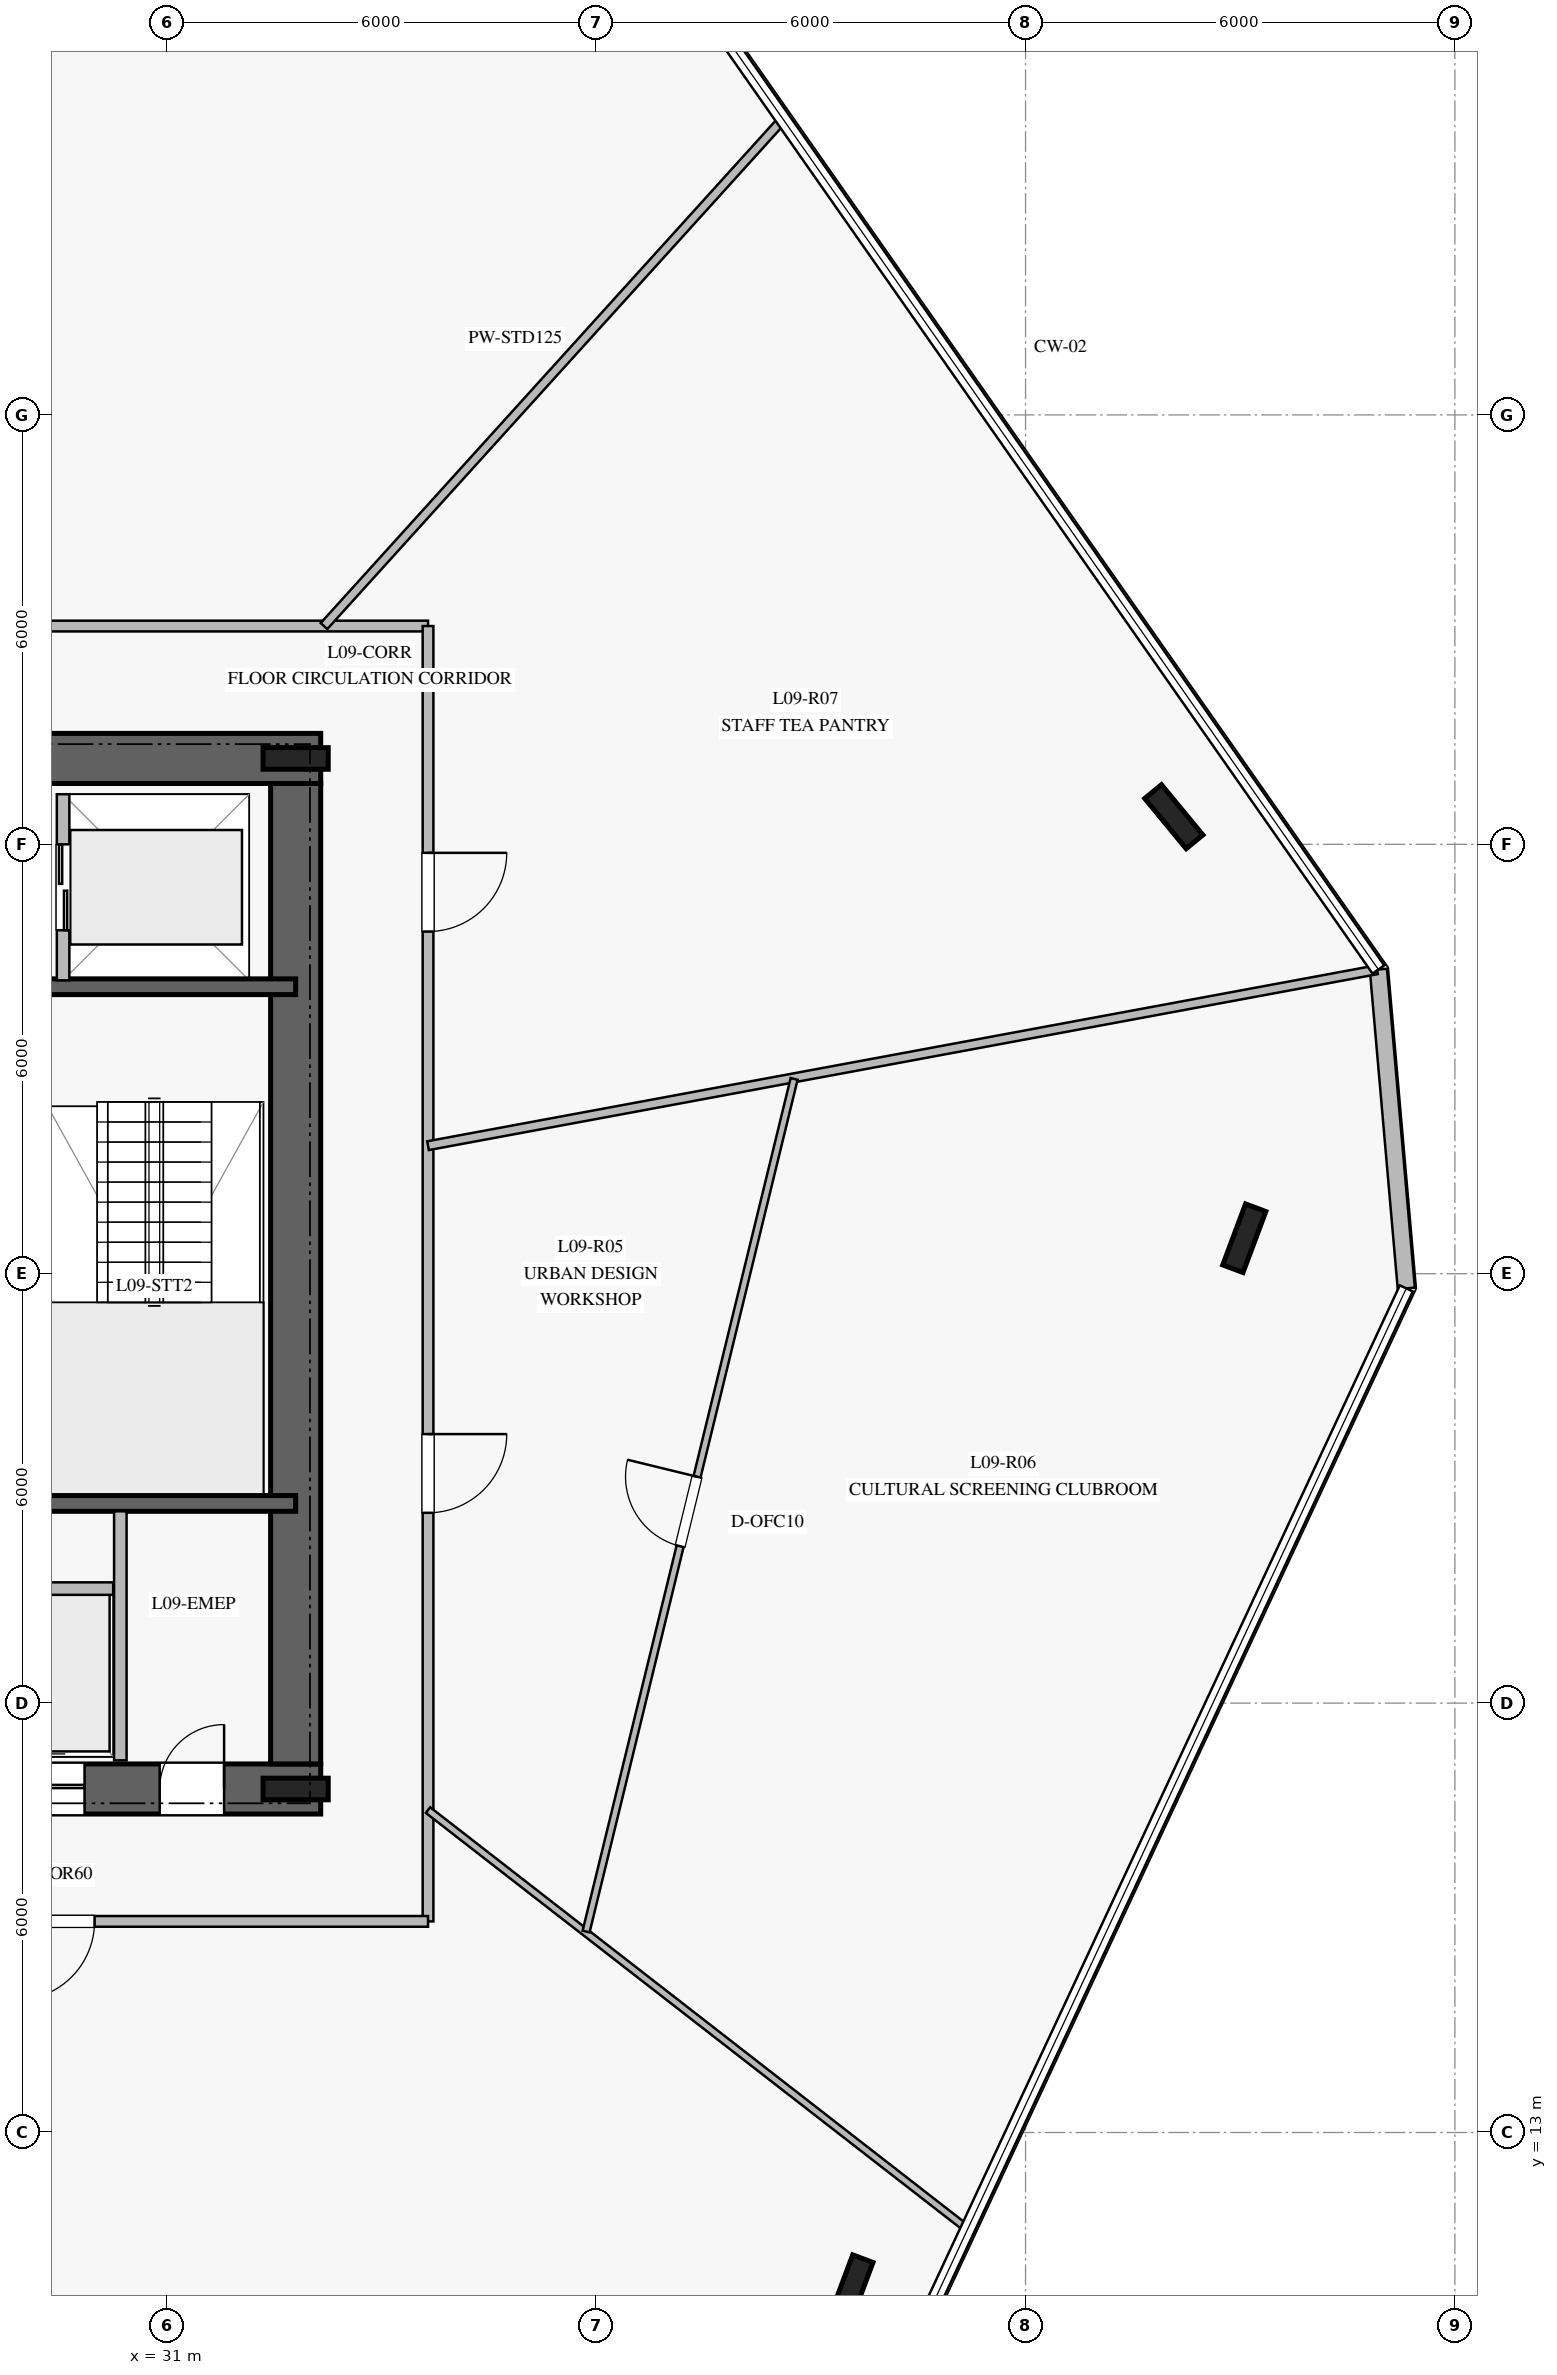
"""IFC4 building model, lengths in metres.
Left out: names, types, materials, properties, quantities, classifications, styles, units other than length and angle.
Written with IfcOpenShell. Run it as: python <this file> out.ifc"""

import sys

from ifc_helpers import new_model, si_unit, direction, frame, frame_2d, origin, origin_2d, place, context, subcontext, project, spatial, rectangle, i_section, extrude, element, fill, save


model = new_model("IFC4")
c1 = context("Model", 3, precision=1e-05, world=origin(), true_north=direction((0.0, 1.0)))
c2 = subcontext(c1, "Body", "Model", "MODEL_VIEW")
j1 = project(units=[si_unit("LENGTHUNIT", "METRE"), si_unit("PLANEANGLEUNIT", "RADIAN")], contexts=[c1])
p1 = place(None, origin())
s1 = spatial("IfcSite", under=j1, at=p1, CompositionType="ELEMENT")
p2 = place(p1, origin())
s2 = spatial("IfcBuilding", under=s1, at=p2, CompositionType="ELEMENT")
p3 = place(p2, frame((0.0, 0.0, 40.0)))
s3 = spatial("IfcBuildingStorey", under=s2, at=p3, CompositionType="ELEMENT", Elevation=40.0)
p4 = place(p3, frame((16.85, 17.8, 0.0), z_axis=(0.0, 0.0, 1.0), x_axis=(1.0, 0.0, 0.0)))
e1 = element("IfcWall", 1, at=p4, inside=s3, PredefinedType="SHEAR", context=c2, shape_type="SweptSolid", body=[
    extrude(rectangle(XDim=16.3, YDim=0.7, at=frame_2d((8.15, 0.0))), origin(), (0.0, 0.0, 1.0), 3.76),
])
p5 = place(p4, frame((5.1, 0.0, 0.0)))
e2 = element("IfcOpeningElement", 2, at=p5, cuts=e1, PredefinedType="OPENING", context=c2, shape_type="SweptSolid", body=[
    extrude(rectangle(XDim=1.2, YDim=2.25, at=frame_2d((0.6, 1.125))), frame((0.0, 0.36, 0.0), z_axis=(0.0, -1.0, 0.0), x_axis=(1.0, 0.0, 0.0)), (0.0, 0.0, 1.0), 0.72),
])
p6 = place(p4, frame((14.05, 0.0, 0.0)))
e3 = element("IfcOpeningElement", 3, at=p6, cuts=e1, PredefinedType="OPENING", context=c2, shape_type="SweptSolid", body=[
    extrude(rectangle(XDim=0.9, YDim=2.1, at=frame_2d((0.45, 1.05))), frame((0.0, 0.36, 0.0), z_axis=(0.0, -1.0, 0.0), x_axis=(1.0, 0.0, 0.0)), (0.0, 0.0, 1.0), 0.72),
])
p7 = place(p4, frame((7.95, 0.0, 0.0)))
e4 = element("IfcOpeningElement", 4, at=p7, cuts=e1, PredefinedType="OPENING", context=c2, shape_type="SweptSolid", body=[
    extrude(rectangle(XDim=1.1, YDim=2.2, at=frame_2d((0.55, 1.1))), frame((0.0, 0.36, 0.0), z_axis=(0.0, -1.0, 0.0), x_axis=(1.0, 0.0, 0.0)), (0.0, 0.0, 1.0), 0.72),
])
p8 = place(p4, frame((9.925, 0.0, 0.0)))
e5 = element("IfcOpeningElement", 5, at=p8, cuts=e1, PredefinedType="OPENING", context=c2, shape_type="SweptSolid", body=[
    extrude(rectangle(XDim=1.1, YDim=2.2, at=frame_2d((0.55, 1.1))), frame((0.0, 0.36, 0.0), z_axis=(0.0, -1.0, 0.0), x_axis=(1.0, 0.0, 0.0)), (0.0, 0.0, 1.0), 0.72),
])
p9 = place(p4, frame((11.9, 0.0, 0.0)))
e6 = element("IfcOpeningElement", 6, at=p9, cuts=e1, PredefinedType="OPENING", context=c2, shape_type="SweptSolid", body=[
    extrude(rectangle(XDim=1.1, YDim=2.2, at=frame_2d((0.55, 1.1))), frame((0.0, 0.36, 0.0), z_axis=(0.0, -1.0, 0.0), x_axis=(1.0, 0.0, 0.0)), (0.0, 0.0, 1.0), 0.72),
])
p10 = place(p3, frame((33.15, 32.2, 0.0), z_axis=(0.0, 0.0, 1.0), x_axis=(-1.0, 0.0, 0.0)))
e7 = element("IfcWall", 7, at=p10, inside=s3, PredefinedType="SHEAR", context=c2, shape_type="SweptSolid", body=[
    extrude(rectangle(XDim=16.3, YDim=0.7, at=frame_2d((8.15, 0.0))), origin(), (0.0, 0.0, 1.0), 3.76),
])
p11 = place(p10, frame((5.1, 0.0, 0.0)))
e8 = element("IfcOpeningElement", 8, at=p11, cuts=e7, PredefinedType="OPENING", context=c2, shape_type="SweptSolid", body=[
    extrude(rectangle(XDim=1.2, YDim=2.25, at=frame_2d((0.6, 1.125))), frame((0.0, 0.36, 0.0), z_axis=(0.0, -1.0, 0.0), x_axis=(1.0, 0.0, 0.0)), (0.0, 0.0, 1.0), 0.72),
])
p12 = place(p3, frame((32.8, 18.15, 0.0), z_axis=(0.0, 0.0, 1.0), x_axis=(0.0, 1.0, 0.0)))
e9 = element("IfcWall", 9, at=p12, inside=s3, PredefinedType="SHEAR", context=c2, shape_type="SweptSolid", body=[
    extrude(rectangle(XDim=13.7, YDim=0.7, at=frame_2d((6.85, 0.0))), origin(), (0.0, 0.0, 1.0), 3.76),
])
for number, where, z_axis, x_axis in (
    (10, (32.8, 17.8, 0.0), (0.0, 0.0, 1.0), (1.0, 0.0, 0.0)),
    (11, (32.8, 32.2, 0.0), (0.0, 0.0, 1.0), (1.0, 0.0, 0.0)),
):
    element("IfcColumn", number, at=place(p3, frame(where, z_axis=z_axis, x_axis=x_axis)), inside=s3, PredefinedType="COLUMN", context=c2, shape_type="SweptSolid", body=[
        extrude(i_section(OverallWidth=0.302, OverallDepth=0.91, WebThickness=0.021, FlangeThickness=0.04, at=origin_2d()), origin(), (0.0, 0.0, 1.0), 4.0),
    ])
for number, where, z_axis, x_axis in (
    (12, (29.08, 21.79, 0.0), (0.0, 0.0, 1.0), (1.0, 0.0, 0.0)),
    (13, (29.08, 29.01, 0.0), (0.0, 0.0, 1.0), (1.0, 0.0, 0.0)),
):
    element("IfcWall", number, at=place(p3, frame(where, z_axis=z_axis, x_axis=x_axis)), inside=s3, PredefinedType="SOLIDWALL", context=c2, shape_type="SweptSolid", body=[
        extrude(rectangle(XDim=3.72, YDim=0.22, at=frame_2d((1.86, 0.0))), origin(), (0.0, 0.0, 1.0), 3.76),
    ])
for number, where, z_axis, x_axis in (
    (14, (45.072, 31.386, 0.0), (0.0, 0.0, 1.0), (-0.636, 0.772, 0.0)),
    (15, (40.567, 10.811, 0.0), (0.0, 0.0, 1.0), (0.35, 0.937, 0.0)),
    (16, (46.057, 25.496, 0.0), (0.0, 0.0, 1.0), (0.35, 0.937, 0.0)),
):
    element("IfcColumn", number, at=place(p3, frame(where, z_axis=z_axis, x_axis=x_axis)), inside=s3, PredefinedType="COLUMN", context=c2, shape_type="SweptSolid", body=[
        extrude(i_section(OverallWidth=0.302, OverallDepth=0.91, WebThickness=0.021, FlangeThickness=0.04, at=origin_2d()), origin(), (0.0, 0.0, 1.0), 4.0),
    ])
p13 = place(p3, frame((48.321, 24.795, 0.0), z_axis=(0.0, 0.0, 1.0), x_axis=(-0.087218406941, 0.996189213699, 0.0)))
e17 = element("IfcWall", 17, at=p13, inside=s3, PredefinedType="STANDARD", context=c2, shape_type="SweptSolid", body=[
    extrude(rectangle(XDim=4.473, YDim=0.24, at=frame_2d((2.237, 0.0))), origin(), (0.0, 0.0, 1.0), 3.76),
])
p14 = place(p3, frame((30.35, 18.2, 0.0), z_axis=(0.0, 0.0, 1.0), x_axis=(0.0, 1.0, 0.0)))
e18 = element("IfcWall", 18, at=p14, inside=s3, PredefinedType="PARTITIONING", context=c2, shape_type="SweptSolid", body=[
    extrude(rectangle(XDim=3.48, YDim=0.175, at=frame_2d((1.74, 0.0))), origin(), (0.0, 0.0, 1.0), 3.76),
])
p15 = place(p3, frame((28.35, 20.6, 0.0), z_axis=(0.0, 0.0, 1.0), x_axis=(1.0, 0.0, 0.0)))
e19 = element("IfcWall", 19, at=p15, inside=s3, PredefinedType="PARTITIONING", context=c2, shape_type="SweptSolid", body=[
    extrude(rectangle(XDim=1.9, YDim=0.175, at=frame_2d((0.95, 0.0))), origin(), (0.0, 0.0, 1.0), 3.76),
])
p16 = place(p3, frame((29.55, 29.1, 0.0), z_axis=(0.0, 0.0, 1.0), x_axis=(0.0, 1.0, 0.0)))
e20 = element("IfcWall", 20, at=p16, inside=s3, PredefinedType="PARTITIONING", context=c2, shape_type="SweptSolid", body=[
    extrude(rectangle(XDim=2.6, YDim=0.175, at=frame_2d((1.3, 0.0))), origin(), (0.0, 0.0, 1.0), 3.76),
])
p17 = place(p16, frame((0.7, 0.0, 0.0)))
e21 = element("IfcOpeningElement", 21, at=p17, cuts=e20, PredefinedType="OPENING", context=c2, shape_type="SweptSolid", body=[
    extrude(rectangle(XDim=1.2, YDim=2.2, at=frame_2d((0.6, 1.1))), frame((0.0, 0.098, 0.0), z_axis=(0.0, -1.0, 0.0), x_axis=(1.0, 0.0, 0.0)), (0.0, 0.0, 1.0), 0.195),
])
p18 = place(p3, frame((15.35, 34.05, 0.0), z_axis=(0.0, 0.0, 1.0), x_axis=(1.0, 0.0, 0.0)))
e22 = element("IfcWall", 22, at=p18, inside=s3, PredefinedType="PARTITIONING", context=c2, shape_type="SweptSolid", body=[
    extrude(rectangle(XDim=19.3, YDim=0.15, at=frame_2d((9.65, 0.0))), origin(), (0.0, 0.0, 1.0), 3.21),
])
p19 = place(p18, frame((12.044, 0.0, 0.0)))
e23 = element("IfcOpeningElement", 23, at=p19, cuts=e22, PredefinedType="OPENING", context=c2, shape_type="SweptSolid", body=[
    extrude(rectangle(XDim=1.1, YDim=2.2, at=frame_2d((0.55, 1.1))), frame((0.0, 0.085, 0.0), z_axis=(0.0, -1.0, 0.0), x_axis=(1.0, 0.0, 0.0)), (0.0, 0.0, 1.0), 0.17),
])
p20 = place(p18, frame((3.351, 0.0, 0.0)))
e24 = element("IfcOpeningElement", 24, at=p20, cuts=e22, PredefinedType="OPENING", context=c2, shape_type="SweptSolid", body=[
    extrude(rectangle(XDim=1.1, YDim=2.2, at=frame_2d((0.55, 1.1))), frame((0.0, 0.085, 0.0), z_axis=(0.0, -1.0, 0.0), x_axis=(1.0, 0.0, 0.0)), (0.0, 0.0, 1.0), 0.17),
])
p21 = place(p3, frame((34.65, 34.05, 0.0), z_axis=(0.0, 0.0, 1.0), x_axis=(0.0, -1.0, 0.0)))
e25 = element("IfcWall", 25, at=p21, inside=s3, PredefinedType="PARTITIONING", context=c2, shape_type="SweptSolid", body=[
    extrude(rectangle(XDim=18.1, YDim=0.15, at=frame_2d((9.05, 0.0))), origin(), (0.0, 0.0, 1.0), 3.21),
])
p22 = place(p21, frame((11.291, 0.0, 0.0)))
e26 = element("IfcOpeningElement", 26, at=p22, cuts=e25, PredefinedType="OPENING", context=c2, shape_type="SweptSolid", body=[
    extrude(rectangle(XDim=1.1, YDim=2.2, at=frame_2d((0.55, 1.1))), frame((0.0, 0.085, 0.0), z_axis=(0.0, -1.0, 0.0), x_axis=(1.0, 0.0, 0.0)), (0.0, 0.0, 1.0), 0.17),
])
p23 = place(p21, frame((3.169, 0.0, 0.0)))
e27 = element("IfcOpeningElement", 27, at=p23, cuts=e25, PredefinedType="OPENING", context=c2, shape_type="SweptSolid", body=[
    extrude(rectangle(XDim=1.1, YDim=2.2, at=frame_2d((0.55, 1.1))), frame((0.0, 0.085, 0.0), z_axis=(0.0, -1.0, 0.0), x_axis=(1.0, 0.0, 0.0)), (0.0, 0.0, 1.0), 0.17),
])
p24 = place(p3, frame((34.65, 15.95, 0.0), z_axis=(0.0, 0.0, 1.0), x_axis=(-1.0, 0.0, 0.0)))
e28 = element("IfcWall", 28, at=p24, inside=s3, PredefinedType="PARTITIONING", context=c2, shape_type="SweptSolid", body=[
    extrude(rectangle(XDim=19.3, YDim=0.15, at=frame_2d((9.65, 0.0))), origin(), (0.0, 0.0, 1.0), 3.21),
])
p25 = place(p24, frame((14.122, 0.0, 0.0)))
e29 = element("IfcOpeningElement", 29, at=p25, cuts=e28, PredefinedType="OPENING", context=c2, shape_type="SweptSolid", body=[
    extrude(rectangle(XDim=1.1, YDim=2.2, at=frame_2d((0.55, 1.1))), frame((0.0, 0.085, 0.0), z_axis=(0.0, -1.0, 0.0), x_axis=(1.0, 0.0, 0.0)), (0.0, 0.0, 1.0), 0.17),
])
p26 = place(p24, frame((4.66, 0.0, 0.0)))
e30 = element("IfcOpeningElement", 30, at=p26, cuts=e28, PredefinedType="OPENING", context=c2, shape_type="SweptSolid", body=[
    extrude(rectangle(XDim=1.1, YDim=2.2, at=frame_2d((0.55, 1.1))), frame((0.0, 0.085, 0.0), z_axis=(0.0, -1.0, 0.0), x_axis=(1.0, 0.0, 0.0)), (0.0, 0.0, 1.0), 0.17),
])
p27 = place(p3, frame((33.196, 34.05, 0.0), z_axis=(0.0, 0.0, 1.0), x_axis=(0.671279167316, 0.741204613806, 0.0)))
e31 = element("IfcWall", 31, at=p27, inside=s3, PredefinedType="PARTITIONING", context=c2, shape_type="SweptSolid", body=[
    extrude(rectangle(XDim=9.539, YDim=0.125, at=frame_2d((4.769, 0.0))), origin(), (0.0, 0.0, 1.0), 3.05),
])
p28 = place(p3, frame((34.65, 17.505, 0.0), z_axis=(0.0, 0.0, 1.0), x_axis=(0.789793468824, -0.613372869145, 0.0)))
e32 = element("IfcWall", 32, at=p28, inside=s3, PredefinedType="MOVABLE", context=c2, shape_type="SweptSolid", body=[
    extrude(rectangle(XDim=9.529, YDim=0.1, at=frame_2d((4.765, 0.0))), origin(), (0.0, 0.0, 1.0), 3.06),
])
p29 = place(p3, frame((34.65, 26.789, 0.0), z_axis=(0.0, 0.0, 1.0), x_axis=(0.983241891736, 0.182305738625, 0.0)))
e33 = element("IfcWall", 33, at=p29, inside=s3, PredefinedType="PARTITIONING", context=c2, shape_type="SweptSolid", body=[
    extrude(rectangle(XDim=13.488, YDim=0.125, at=frame_2d((6.744, 0.0))), origin(), (0.0, 0.0, 1.0), 3.06),
])
p30 = place(p3, frame((36.859, 15.808, 0.0), z_axis=(0.0, 0.0, 1.0), x_axis=(0.237065253886, 0.971493728955, 0.0)))
e34 = element("IfcWall", 34, at=p30, inside=s3, PredefinedType="MOVABLE", context=c2, shape_type="SweptSolid", body=[
    extrude(rectangle(XDim=12.263, YDim=0.1, at=frame_2d((6.132, 0.0))), origin(), (0.0, 0.0, 1.0), 3.76),
])
p31 = place(p30, frame((5.542, 0.0, 0.0)))
e35 = element("IfcOpeningElement", 35, at=p31, cuts=e34, PredefinedType="OPENING", context=c2, shape_type="SweptSolid", body=[
    extrude(rectangle(XDim=1.0, YDim=2.15, at=frame_2d((0.5, 1.075))), frame((0.0, 0.06, 0.0), z_axis=(0.0, -1.0, 0.0), x_axis=(1.0, 0.0, 0.0)), (0.0, 0.0, 1.0), 0.12),
])
p32 = place(p6, origin())
e36 = element("IfcDoor", 36, at=p32, inside=s3, OperationType="SINGLE_SWING_RIGHT", PredefinedType="DOOR", context=c2, shape_type="SweptSolid", body=[
    extrude(rectangle(XDim=0.9, YDim=2.1, at=frame_2d((0.45, 1.05))), frame((0.0, 0.025, 0.0), z_axis=(0.0, -1.0, 0.0), x_axis=(1.0, 0.0, 0.0)), (0.0, 0.0, 1.0), 0.05),
])
fill(e3, e36)
p33 = place(p9, origin())
e37 = element("IfcDoor", 37, at=p33, inside=s3, OperationType="DOUBLE_DOOR_SLIDING", PredefinedType="DOOR", context=c2, shape_type="SweptSolid", body=[
    extrude(rectangle(XDim=1.1, YDim=2.2, at=frame_2d((0.55, 1.1))), frame((0.0, 0.025, 0.0), z_axis=(0.0, -1.0, 0.0), x_axis=(1.0, 0.0, 0.0)), (0.0, 0.0, 1.0), 0.05),
])
fill(e6, e37)
p34 = place(p17, origin())
e38 = element("IfcDoor", 38, at=p34, inside=s3, OperationType="DOUBLE_DOOR_SLIDING", PredefinedType="DOOR", context=c2, shape_type="SweptSolid", body=[
    extrude(rectangle(XDim=1.2, YDim=2.2, at=frame_2d((0.6, 1.1))), frame((0.0, 0.025, 0.0), z_axis=(0.0, -1.0, 0.0), x_axis=(1.0, 0.0, 0.0)), (0.0, 0.0, 1.0), 0.05),
])
fill(e21, e38)
p35 = place(p26, origin())
e39 = element("IfcDoor", 39, at=p35, inside=s3, OperationType="SINGLE_SWING_RIGHT", PredefinedType="DOOR", context=c2, shape_type="SweptSolid", body=[
    extrude(rectangle(XDim=1.1, YDim=2.2, at=frame_2d((0.55, 1.1))), frame((0.0, 0.025, 0.0), z_axis=(0.0, -1.0, 0.0), x_axis=(1.0, 0.0, 0.0)), (0.0, 0.0, 1.0), 0.05),
])
fill(e30, e39)
p36 = place(p22, origin())
e40 = element("IfcDoor", 40, at=p36, inside=s3, OperationType="SINGLE_SWING_LEFT", PredefinedType="DOOR", context=c2, shape_type="SweptSolid", body=[
    extrude(rectangle(XDim=1.1, YDim=2.2, at=frame_2d((0.55, 1.1))), frame((0.0, 0.025, 0.0), z_axis=(0.0, -1.0, 0.0), x_axis=(1.0, 0.0, 0.0)), (0.0, 0.0, 1.0), 0.05),
])
fill(e26, e40)
p37 = place(p31, origin())
e41 = element("IfcDoor", 41, at=p37, inside=s3, OperationType="SINGLE_SWING_RIGHT", PredefinedType="DOOR", context=c2, shape_type="SweptSolid", body=[
    extrude(rectangle(XDim=1.0, YDim=2.15, at=frame_2d((0.5, 1.075))), frame((0.0, 0.025, 0.0), z_axis=(0.0, -1.0, 0.0), x_axis=(1.0, 0.0, 0.0)), (0.0, 0.0, 1.0), 0.05),
])
fill(e35, e41)
p38 = place(p23, origin())
e42 = element("IfcDoor", 42, at=p38, inside=s3, OperationType="SINGLE_SWING_LEFT", PredefinedType="DOOR", context=c2, shape_type="SweptSolid", body=[
    extrude(rectangle(XDim=1.1, YDim=2.2, at=frame_2d((0.55, 1.1))), frame((0.0, 0.025, 0.0), z_axis=(0.0, -1.0, 0.0), x_axis=(1.0, 0.0, 0.0)), (0.0, 0.0, 1.0), 0.05),
])
fill(e27, e42)
save(model, sys.argv[1])
